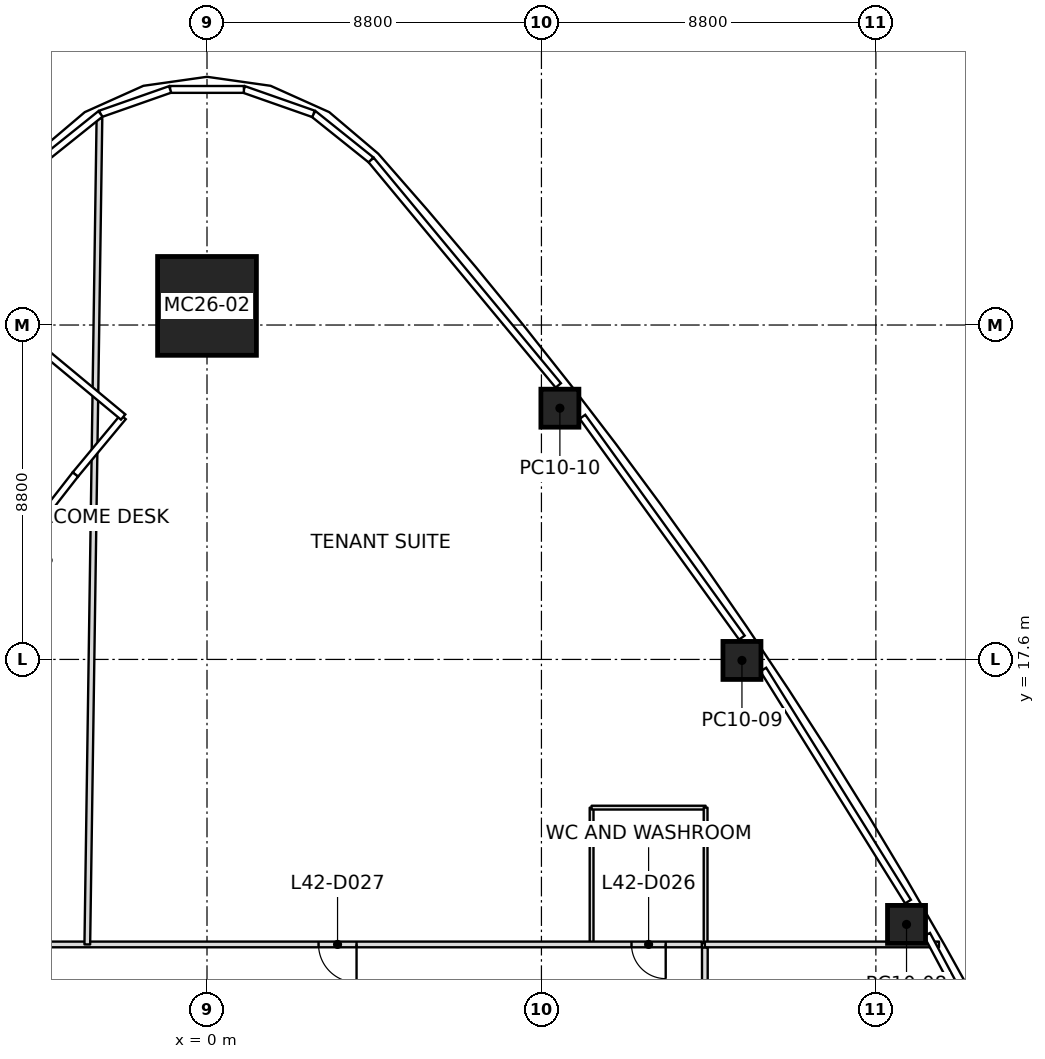
"""IFC4 building model, lengths in metres.
Left out: names, types, materials, properties, quantities, classifications, styles, units other than length and angle.
Written with IfcOpenShell. Run it as: python <this file> out.ifc"""

import sys

from ifc_helpers import new_model, si_unit, direction, frame, frame_2d, origin, origin_2d, place, context, subcontext, project, spatial, rectangle, extrude, element, fill, save


model = new_model("IFC4")
c1 = context("Model", 3, precision=1e-05, world=origin(), true_north=direction((0.0, 1.0)))
c2 = subcontext(c1, "Body", "Model", "MODEL_VIEW")
j1 = project(units=[si_unit("LENGTHUNIT", "METRE"), si_unit("PLANEANGLEUNIT", "RADIAN")], contexts=[c1])
p1 = place(None, origin())
s1 = spatial("IfcSite", under=j1, at=p1, CompositionType="ELEMENT")
p2 = place(p1, origin())
s2 = spatial("IfcBuilding", under=s1, at=p2, CompositionType="ELEMENT")
p3 = place(p2, frame((0.0, 0.0, 189.8)))
s3 = spatial("IfcBuildingStorey", under=s2, at=p3, CompositionType="ELEMENT", Elevation=189.8)
p4 = place(p3, frame((0.0, 26.903, 0.0), z_axis=(0.0, -0.032331720729, 0.999477193254), x_axis=(1.0, 0.0, 0.0)))
e1 = element("IfcColumn", 1, at=p4, inside=s3, PredefinedType="COLUMN", context=c2, shape_type="SweptSolid", body=[
    extrude(rectangle(XDim=2.6, YDim=2.6, at=origin_2d()), origin(), (0.0, 0.0, 1.0), 4.002),
])
p5 = place(p3, frame((18.407, 10.627, 0.0), z_axis=(-0.009887049298, -0.00573692984, 0.999934664812), x_axis=(-0.499975560967, 0.866039512843, 2.5126546e-05)))
e2 = element("IfcColumn", 2, at=p5, inside=s3, PredefinedType="COLUMN", context=c2, shape_type="SweptSolid", body=[
    extrude(rectangle(XDim=1.0, YDim=1.0, at=origin_2d()), origin(), (0.0, 0.0, 1.0), 4.0),
])
p6 = place(p3, frame((14.076, 17.574, 0.0), z_axis=(-0.005248490815, -0.013243284963, 0.999898529226), x_axis=(-0.557430280298, 0.830184536974, 0.00806952151)))
e3 = element("IfcColumn", 3, at=p6, inside=s3, PredefinedType="COLUMN", context=c2, shape_type="SweptSolid", body=[
    extrude(rectangle(XDim=1.0, YDim=1.0, at=origin_2d()), origin(), (0.0, 0.0, 1.0), 4.0),
])
p7 = place(p3, frame((9.286, 24.211, 0.0), z_axis=(-0.000183067202, -0.020442504242, 0.999791013416), x_axis=(-0.612322145425, 0.790445437443, 0.016049942328)))
e4 = element("IfcColumn", 4, at=p7, inside=s3, PredefinedType="COLUMN", context=c2, shape_type="SweptSolid", body=[
    extrude(rectangle(XDim=1.0, YDim=1.0, at=origin_2d()), origin(), (0.0, 0.0, 1.0), 4.001),
])
p8 = place(p3, frame((-3.15, 10.1, 0.0), z_axis=(0.0, 0.0, 1.0), x_axis=(0.014702310804, 0.999891915187, 0.0)))
e5 = element("IfcWall", 5, at=p8, inside=s3, PredefinedType="PARTITIONING", context=c2, shape_type="SweptSolid", body=[
    extrude(rectangle(XDim=21.737, YDim=0.15, at=frame_2d((10.868, 0.0))), origin(), (0.0, 0.0, 1.0), 3.234),
])
p9 = place(p3, frame((13.1, 10.1, 0.0), z_axis=(0.0, 0.0, 1.0), x_axis=(1.0, 0.0, 0.0)))
e6 = element("IfcWall", 6, at=p9, inside=s3, PredefinedType="PARTITIONING", context=c2, shape_type="SweptSolid", body=[
    extrude(rectangle(XDim=6.161, YDim=0.15, at=frame_2d((3.08, 0.0))), origin(), (0.0, 0.0, 1.0), 3.234),
])
p10 = place(p3, frame((13.02, 10.1, 0.0), z_axis=(0.0, 0.0, 1.0), x_axis=(-1.0, 0.0, 0.0)))
e7 = element("IfcWall", 7, at=p10, inside=s3, PredefinedType="PARTITIONING", context=c2, shape_type="SweptSolid", body=[
    extrude(rectangle(XDim=25.17, YDim=0.15, at=frame_2d((12.585, 0.0))), origin(), (0.0, 0.0, 1.0), 3.166),
])
p11 = place(p10, frame((0.95, 0.0, 0.0)))
e8 = element("IfcOpeningElement", 8, at=p11, cuts=e7, PredefinedType="OPENING", context=c2, shape_type="SweptSolid", body=[
    extrude(rectangle(XDim=0.9, YDim=2.1, at=frame_2d((0.45, 1.05))), frame((0.0, 0.075, 0.0), z_axis=(0.0, -1.0, 0.0), x_axis=(1.0, 0.0, 0.0)), (0.0, 0.0, 1.0), 0.15),
])
p12 = place(p10, frame((9.085, 0.0, 0.0)))
e9 = element("IfcOpeningElement", 9, at=p12, cuts=e7, PredefinedType="OPENING", context=c2, shape_type="SweptSolid", body=[
    extrude(rectangle(XDim=1.0, YDim=2.1, at=frame_2d((0.5, 1.05))), frame((0.0, 0.075, 0.0), z_axis=(0.0, -1.0, 0.0), x_axis=(1.0, 0.0, 0.0)), (0.0, 0.0, 1.0), 0.15),
])
p13 = place(p10, frame((20.17, 0.0, 0.0)))
e10 = element("IfcOpeningElement", 10, at=p13, cuts=e7, PredefinedType="OPENING", context=c2, shape_type="SweptSolid", body=[
    extrude(rectangle(XDim=1.0, YDim=2.1, at=frame_2d((0.5, 1.05))), frame((0.0, 0.075, 0.0), z_axis=(0.0, -1.0, 0.0), x_axis=(1.0, 0.0, 0.0)), (0.0, 0.0, 1.0), 0.15),
])
p14 = place(p3, frame((13.1, -10.02, 0.0), z_axis=(0.0, 0.0, 1.0), x_axis=(0.0, 1.0, 0.0)))
e11 = element("IfcWall", 11, at=p14, inside=s3, PredefinedType="PARTITIONING", context=c2, shape_type="SweptSolid", body=[
    extrude(rectangle(XDim=20.04, YDim=0.15, at=frame_2d((10.02, 0.0))), origin(), (0.0, 0.0, 1.0), 3.166),
])
p15 = place(p14, frame((15.12, 0.0, 0.0)))
e12 = element("IfcOpeningElement", 12, at=p15, cuts=e11, PredefinedType="OPENING", context=c2, shape_type="SweptSolid", body=[
    extrude(rectangle(XDim=1.0, YDim=2.1, at=frame_2d((0.5, 1.05))), frame((0.0, 0.075, 0.0), z_axis=(0.0, -1.0, 0.0), x_axis=(1.0, 0.0, 0.0)), (0.0, 0.0, 1.0), 0.15),
])
p16 = place(p14, frame((0.95, 0.0, 0.0)))
e13 = element("IfcOpeningElement", 13, at=p16, cuts=e11, PredefinedType="OPENING", context=c2, shape_type="SweptSolid", body=[
    extrude(rectangle(XDim=0.9, YDim=2.1, at=frame_2d((0.45, 1.05))), frame((0.0, 0.075, 0.0), z_axis=(0.0, -1.0, 0.0), x_axis=(1.0, 0.0, 0.0)), (0.0, 0.0, 1.0), 0.15),
])
p17 = place(p14, frame((6.56, 0.0, 0.0)))
e14 = element("IfcOpeningElement", 14, at=p17, cuts=e11, PredefinedType="OPENING", context=c2, shape_type="SweptSolid", body=[
    extrude(rectangle(XDim=1.0, YDim=2.1, at=frame_2d((0.5, 1.05))), frame((0.0, 0.075, 0.0), z_axis=(0.0, -1.0, 0.0), x_axis=(1.0, 0.0, 0.0)), (0.0, 0.0, 1.0), 0.15),
])
p18 = place(p3, frame((10.12, 10.13, 0.0), z_axis=(0.0, 0.0, 1.0), x_axis=(0.0, 1.0, 0.0)))
e15 = element("IfcWall", 15, at=p18, inside=s3, PredefinedType="PARTITIONING", context=c2, shape_type="SweptSolid", body=[
    extrude(rectangle(XDim=3.57, YDim=0.1, at=frame_2d((1.785, 0.0))), origin(), (0.0, 0.0, 1.0), 3.247),
])
p19 = place(p3, frame((10.12, 13.7, 0.0), z_axis=(0.0, 0.0, 1.0), x_axis=(1.0, 0.0, 0.0)))
e16 = element("IfcWall", 16, at=p19, inside=s3, PredefinedType="PARTITIONING", context=c2, shape_type="SweptSolid", body=[
    extrude(rectangle(XDim=3.0, YDim=0.1, at=frame_2d((1.5, 0.0))), origin(), (0.0, 0.0, 1.0), 3.247),
])
p20 = place(p3, frame((13.12, 13.7, 0.0), z_axis=(0.0, 0.0, 1.0), x_axis=(0.0, -1.0, 0.0)))
e17 = element("IfcWall", 17, at=p20, inside=s3, PredefinedType="PARTITIONING", context=c2, shape_type="SweptSolid", body=[
    extrude(rectangle(XDim=3.57, YDim=0.1, at=frame_2d((1.785, 0.0))), origin(), (0.0, 0.0, 1.0), 3.393),
])
p21 = place(p11, origin())
e18 = element("IfcDoor", 18, at=p21, inside=s3, OperationType="SINGLE_SWING_RIGHT", PredefinedType="DOOR", context=c2, shape_type="SweptSolid", body=[
    extrude(rectangle(XDim=0.9, YDim=2.1, at=frame_2d((0.45, 1.05))), frame((0.0, 0.025, 0.0), z_axis=(0.0, -1.0, 0.0), x_axis=(1.0, 0.0, 0.0)), (0.0, 0.0, 1.0), 0.05),
])
fill(e8, e18)
p22 = place(p12, origin())
e19 = element("IfcDoor", 19, at=p22, inside=s3, OperationType="SINGLE_SWING_RIGHT", PredefinedType="DOOR", context=c2, shape_type="SweptSolid", body=[
    extrude(rectangle(XDim=1.0, YDim=2.1, at=frame_2d((0.5, 1.05))), frame((0.0, 0.025, 0.0), z_axis=(0.0, -1.0, 0.0), x_axis=(1.0, 0.0, 0.0)), (0.0, 0.0, 1.0), 0.05),
])
fill(e9, e19)
save(model, sys.argv[1])
